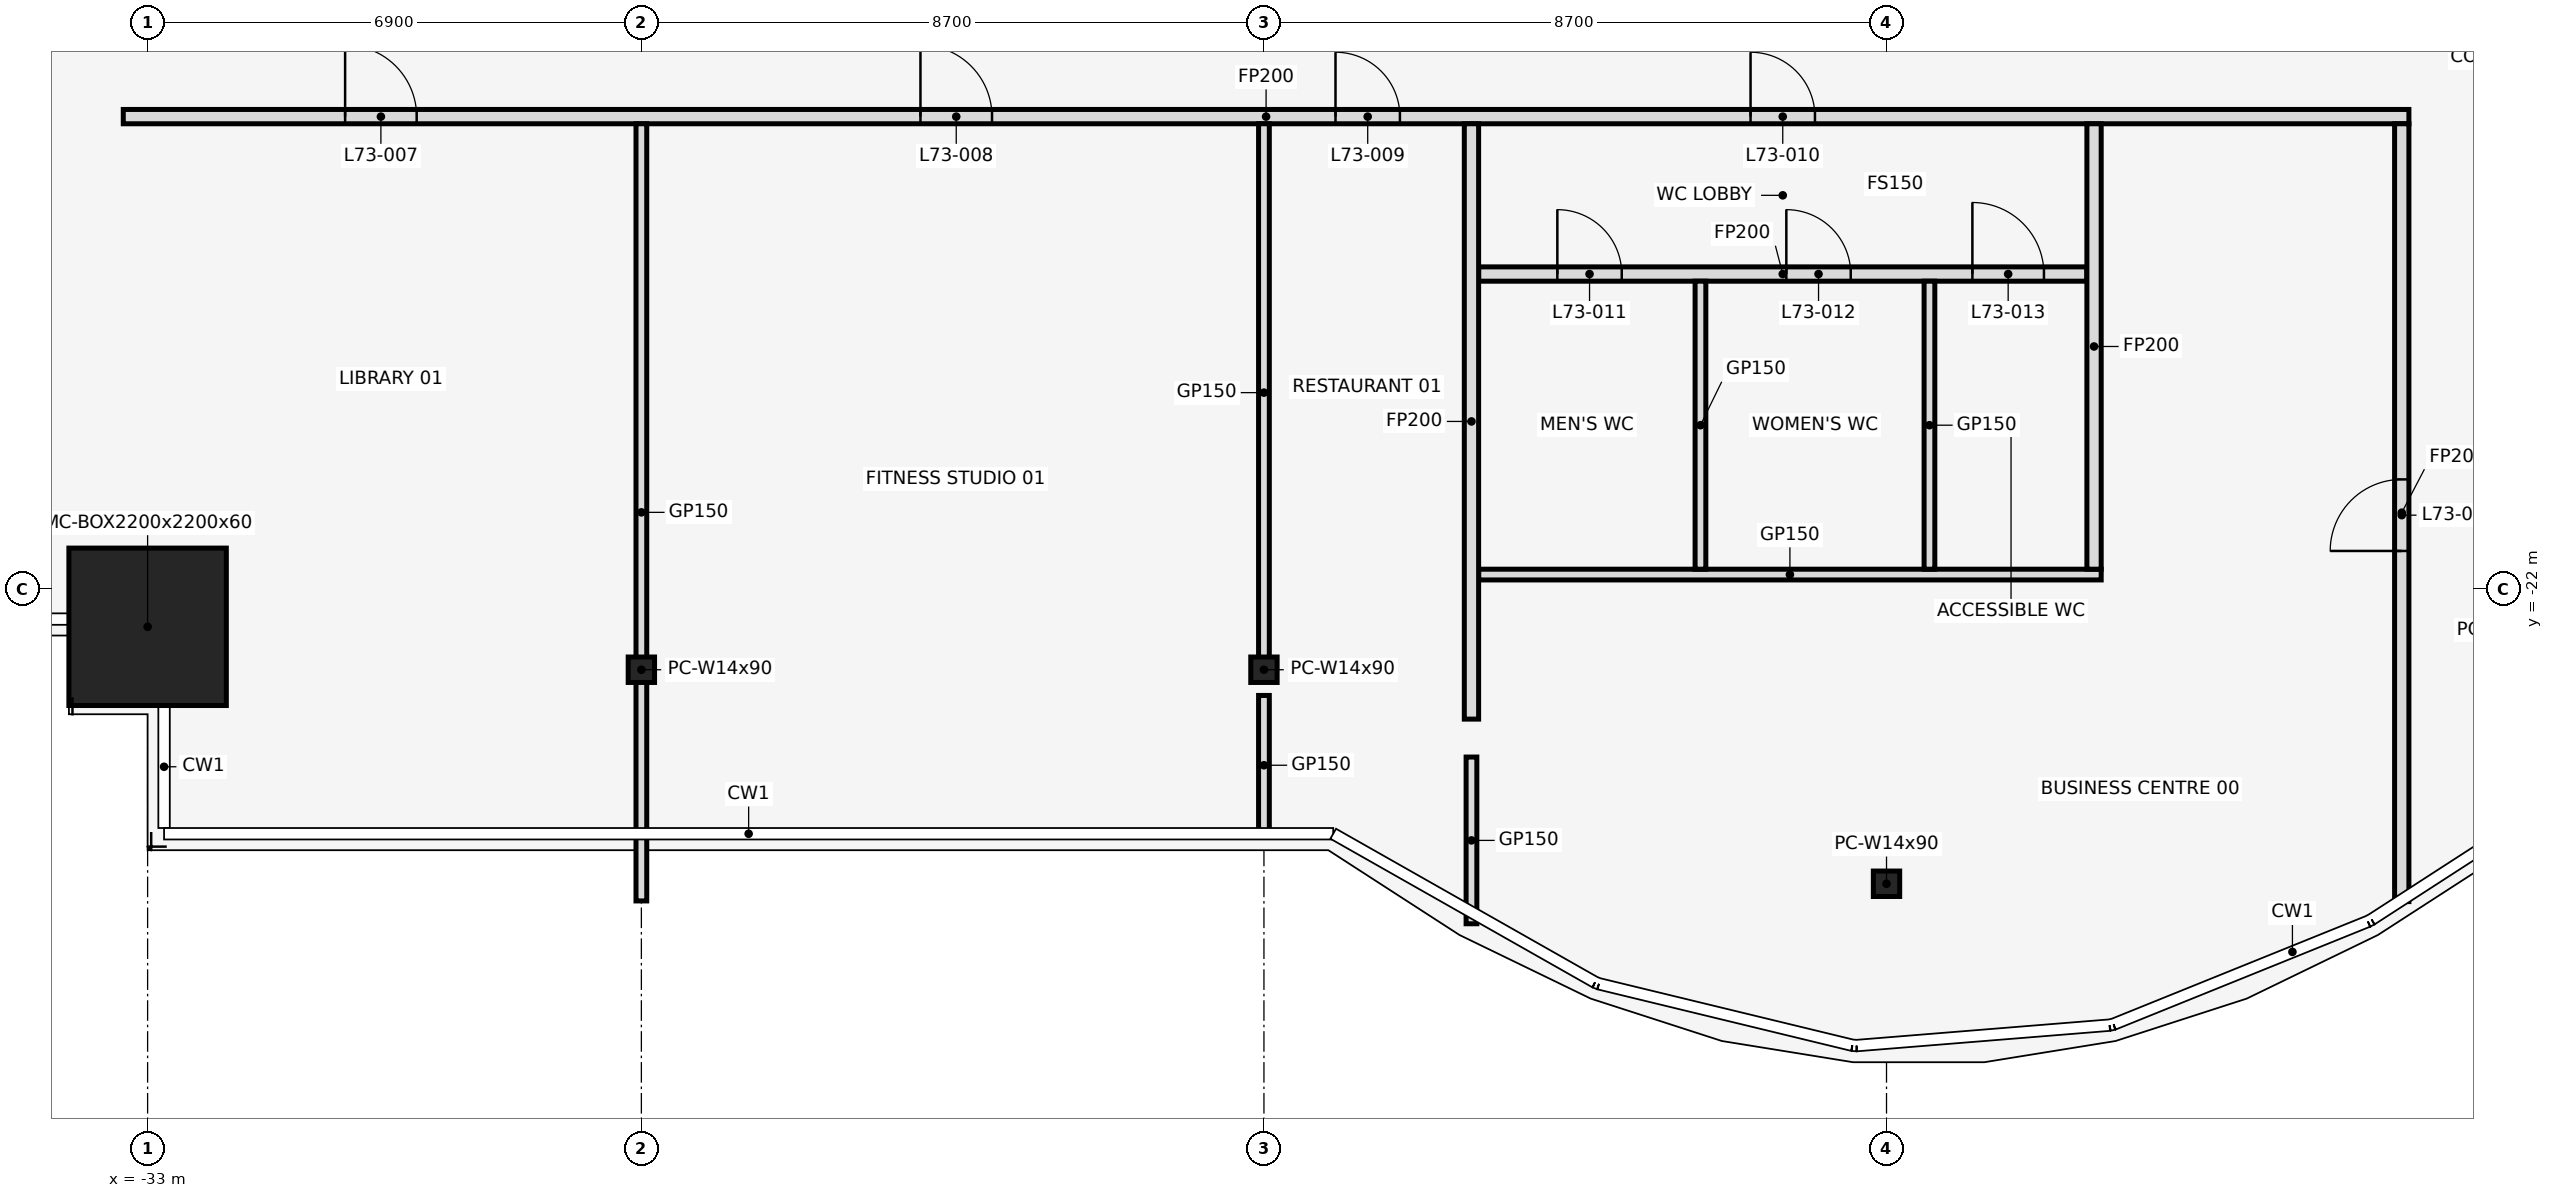
"""IFC4 building model, lengths in metres.
Left out: names, types, materials, properties, quantities, classifications, styles, units other than length and angle.
Written with IfcOpenShell. Run it as: python <this file> out.ifc"""

import sys

from ifc_helpers import new_model, si_unit, direction, frame, frame_2d, origin, origin_2d, place, context, subcontext, project, spatial, rectangle, hollow_rectangle, i_section, extrude, element, fill, save


model = new_model("IFC4")
c1 = context("Model", 3, precision=1e-05, world=origin(), true_north=direction((0.0, 1.0)))
c2 = subcontext(c1, "Body", "Model", "MODEL_VIEW")
j1 = project(units=[si_unit("LENGTHUNIT", "METRE"), si_unit("PLANEANGLEUNIT", "RADIAN")], contexts=[c1])
p1 = place(None, origin())
s1 = spatial("IfcSite", under=j1, at=p1, CompositionType="ELEMENT")
p2 = place(p1, origin())
s2 = spatial("IfcBuilding", under=s1, at=p2, CompositionType="ELEMENT")
p3 = place(p2, frame((0.0, 0.0, 324.5)))
s3 = spatial("IfcBuildingStorey", under=s2, at=p3, CompositionType="ELEMENT", Elevation=324.5)
p4 = place(p3, frame((-33.0, -22.53, 0.0), z_axis=(0.0, 0.0, 1.0), x_axis=(1.0, 0.0, 0.0)))
e1 = element("IfcColumn", 1, at=p4, inside=s3, PredefinedType="COLUMN", context=c2, shape_type="SweptSolid", body=[
    extrude(hollow_rectangle(XDim=2.2, YDim=2.2, WallThickness=0.06, at=origin_2d()), origin(), (0.0, 0.0, 1.0), 4.5),
])
for number, where, z_axis, x_axis in (
    (2, (-26.1, -23.13, 0.0), (0.0, 0.0, 1.0), (1.0, 0.0, 0.0)),
    (3, (-17.4, -23.13, 0.0), (0.0, 0.0, 1.0), (1.0, 0.0, 0.0)),
    (4, (-8.7, -26.121, 0.0), (0.0, 0.0, 1.0), (1.0, 0.0, 0.0)),
):
    element("IfcColumn", number, at=place(p3, frame(where, z_axis=z_axis, x_axis=x_axis)), inside=s3, PredefinedType="COLUMN", context=c2, shape_type="SweptSolid", body=[
        extrude(i_section(OverallWidth=0.368, OverallDepth=0.356, WebThickness=0.011, FlangeThickness=0.018, at=origin_2d()), origin(), (0.0, 0.0, 1.0), 4.5),
    ])
p5 = place(p3, frame((-14.4, -21.8, 0.0), z_axis=(0.0, 0.0, 1.0), x_axis=(1.0, 0.0, 0.0)))
e5 = element("IfcWall", 5, at=p5, inside=s3, PredefinedType="PARTITIONING", context=c2, shape_type="SweptSolid", body=[
    extrude(rectangle(XDim=8.7, YDim=0.15, at=frame_2d((4.35, 0.0))), origin(), (0.0, 0.0, 1.0), 3.418),
])
p6 = place(p3, frame((-14.4, -17.6, 0.0), z_axis=(0.0, 0.0, 1.0), x_axis=(1.0, 0.0, 0.0)))
e6 = element("IfcWall", 6, at=p6, inside=s3, PredefinedType="PARTITIONING", context=c2, shape_type="SweptSolid", body=[
    extrude(rectangle(XDim=8.5, YDim=0.2, at=frame_2d((4.25, 0.0))), origin(), (0.0, 0.0, 1.0), 3.418),
])
p7 = place(p6, frame((1.1, 0.0, 0.0)))
e7 = element("IfcOpeningElement", 7, at=p7, cuts=e6, PredefinedType="OPENING", context=c2, shape_type="SweptSolid", body=[
    extrude(rectangle(XDim=0.9, YDim=2.1, at=frame_2d((0.45, 1.05))), frame((0.0, 0.112, 0.0), z_axis=(0.0, -1.0, 0.0), x_axis=(1.0, 0.0, 0.0)), (0.0, 0.0, 1.0), 0.224),
])
p8 = place(p6, frame((4.3, 0.0, 0.0)))
e8 = element("IfcOpeningElement", 8, at=p8, cuts=e6, PredefinedType="OPENING", context=c2, shape_type="SweptSolid", body=[
    extrude(rectangle(XDim=0.9, YDim=2.1, at=frame_2d((0.45, 1.05))), frame((0.0, 0.112, 0.0), z_axis=(0.0, -1.0, 0.0), x_axis=(1.0, 0.0, 0.0)), (0.0, 0.0, 1.0), 0.224),
])
p9 = place(p6, frame((6.9, 0.0, 0.0)))
e9 = element("IfcOpeningElement", 9, at=p9, cuts=e6, PredefinedType="OPENING", context=c2, shape_type="SweptSolid", body=[
    extrude(rectangle(XDim=1.0, YDim=2.1, at=frame_2d((0.5, 1.05))), frame((0.0, 0.112, 0.0), z_axis=(0.0, -1.0, 0.0), x_axis=(1.0, 0.0, 0.0)), (0.0, 0.0, 1.0), 0.224),
])
p10 = place(p3, frame((-33.34, -15.4, 0.0), z_axis=(0.0, 0.0, 1.0), x_axis=(1.0, 0.0, 0.0)))
e10 = element("IfcWall", 10, at=p10, inside=s3, PredefinedType="PARTITIONING", context=c2, shape_type="SweptSolid", body=[
    extrude(rectangle(XDim=31.94, YDim=0.2, at=frame_2d((15.97, 0.0))), origin(), (0.0, 0.0, 1.0), 3.418),
])
p11 = place(p10, frame((3.1, 0.0, 0.0)))
e11 = element("IfcOpeningElement", 11, at=p11, cuts=e10, PredefinedType="OPENING", context=c2, shape_type="SweptSolid", body=[
    extrude(rectangle(XDim=1.0, YDim=2.1, at=frame_2d((0.5, 1.05))), frame((0.0, 0.112, 0.0), z_axis=(0.0, -1.0, 0.0), x_axis=(1.0, 0.0, 0.0)), (0.0, 0.0, 1.0), 0.224),
])
p12 = place(p10, frame((11.14, 0.0, 0.0)))
e12 = element("IfcOpeningElement", 12, at=p12, cuts=e10, PredefinedType="OPENING", context=c2, shape_type="SweptSolid", body=[
    extrude(rectangle(XDim=1.0, YDim=2.1, at=frame_2d((0.5, 1.05))), frame((0.0, 0.112, 0.0), z_axis=(0.0, -1.0, 0.0), x_axis=(1.0, 0.0, 0.0)), (0.0, 0.0, 1.0), 0.224),
])
p13 = place(p10, frame((16.94, 0.0, 0.0)))
e13 = element("IfcOpeningElement", 13, at=p13, cuts=e10, PredefinedType="OPENING", context=c2, shape_type="SweptSolid", body=[
    extrude(rectangle(XDim=0.9, YDim=2.1, at=frame_2d((0.45, 1.05))), frame((0.0, 0.112, 0.0), z_axis=(0.0, -1.0, 0.0), x_axis=(1.0, 0.0, 0.0)), (0.0, 0.0, 1.0), 0.224),
])
p14 = place(p10, frame((22.74, 0.0, 0.0)))
e14 = element("IfcOpeningElement", 14, at=p14, cuts=e10, PredefinedType="OPENING", context=c2, shape_type="SweptSolid", body=[
    extrude(rectangle(XDim=0.9, YDim=2.1, at=frame_2d((0.45, 1.05))), frame((0.0, 0.112, 0.0), z_axis=(0.0, -1.0, 0.0), x_axis=(1.0, 0.0, 0.0)), (0.0, 0.0, 1.0), 0.224),
])
p15 = place(p3, frame((-26.1, -26.361, 0.0), z_axis=(0.0, 0.0, 1.0), x_axis=(0.0, 1.0, 0.0)))
e15 = element("IfcWall", 15, at=p15, inside=s3, PredefinedType="PARTITIONING", context=c2, shape_type="SweptSolid", body=[
    extrude(rectangle(XDim=10.861, YDim=0.15, at=frame_2d((5.431, 0.0))), origin(), (0.0, 0.0, 1.0), 3.418),
])
p16 = place(p3, frame((-17.4, -25.44, 0.0), z_axis=(0.0, 0.0, 1.0), x_axis=(0.0, 1.0, 0.0)))
e16 = element("IfcWall", 16, at=p16, inside=s3, PredefinedType="PARTITIONING", context=c2, shape_type="SweptSolid", body=[
    extrude(rectangle(XDim=1.951, YDim=0.15, at=frame_2d((0.975, 0.0))), origin(), (0.0, 0.0, 1.0), 3.418),
])
p17 = place(p3, frame((-17.4, -23.015, 0.0), z_axis=(0.0, 0.0, 1.0), x_axis=(0.0, 1.0, 0.0)))
e17 = element("IfcWall", 17, at=p17, inside=s3, PredefinedType="PARTITIONING", context=c2, shape_type="SweptSolid", body=[
    extrude(rectangle(XDim=7.515, YDim=0.15, at=frame_2d((3.757, 0.0))), origin(), (0.0, 0.0, 1.0), 3.418),
])
p18 = place(p3, frame((-14.5, -26.68, 0.0), z_axis=(0.0, 0.0, 1.0), x_axis=(0.0, 1.0, 0.0)))
e18 = element("IfcWall", 18, at=p18, inside=s3, PredefinedType="PARTITIONING", context=c2, shape_type="SweptSolid", body=[
    extrude(rectangle(XDim=2.33, YDim=0.15, at=frame_2d((1.165, 0.0))), origin(), (0.0, 0.0, 1.0), 3.418),
])
p19 = place(p3, frame((-14.5, -23.82, 0.0), z_axis=(0.0, 0.0, 1.0), x_axis=(0.0, 1.0, 0.0)))
e19 = element("IfcWall", 19, at=p19, inside=s3, PredefinedType="PARTITIONING", context=c2, shape_type="SweptSolid", body=[
    extrude(rectangle(XDim=8.32, YDim=0.2, at=frame_2d((4.16, 0.0))), origin(), (0.0, 0.0, 1.0), 3.418),
])
for number, where, z_axis, x_axis in (
    (20, (-11.3, -21.725, 0.0), (0.0, 0.0, 1.0), (0.0, 1.0, 0.0)),
    (21, (-8.1, -21.725, 0.0), (0.0, 0.0, 1.0), (0.0, 1.0, 0.0)),
):
    element("IfcWall", number, at=place(p3, frame(where, z_axis=z_axis, x_axis=x_axis)), inside=s3, PredefinedType="PARTITIONING", context=c2, shape_type="SweptSolid", body=[
        extrude(rectangle(XDim=4.025, YDim=0.15, at=frame_2d((2.013, 0.0))), origin(), (0.0, 0.0, 1.0), 3.418),
    ])
p20 = place(p3, frame((-5.8, -21.725, 0.0), z_axis=(0.0, 0.0, 1.0), x_axis=(0.0, 1.0, 0.0)))
e22 = element("IfcWall", 22, at=p20, inside=s3, PredefinedType="PARTITIONING", context=c2, shape_type="SweptSolid", body=[
    extrude(rectangle(XDim=6.225, YDim=0.2, at=frame_2d((3.113, 0.0))), origin(), (0.0, 0.0, 1.0), 3.418),
])
p21 = place(p3, frame((-1.5, -26.37, 0.0), z_axis=(0.0, 0.0, 1.0), x_axis=(0.0, 1.0, 0.0)))
e23 = element("IfcWall", 23, at=p21, inside=s3, PredefinedType="PARTITIONING", context=c2, shape_type="SweptSolid", body=[
    extrude(rectangle(XDim=10.87, YDim=0.2, at=frame_2d((5.435, 0.0))), origin(), (0.0, 0.0, 1.0), 3.418),
])
p22 = place(p21, frame((4.9, 0.0, 0.0)))
e24 = element("IfcOpeningElement", 24, at=p22, cuts=e23, PredefinedType="OPENING", context=c2, shape_type="SweptSolid", body=[
    extrude(rectangle(XDim=1.0, YDim=2.1, at=frame_2d((0.5, 1.05))), frame((0.0, 0.112, 0.0), z_axis=(0.0, -1.0, 0.0), x_axis=(1.0, 0.0, 0.0)), (0.0, 0.0, 1.0), 0.224),
])
p23 = place(p11, frame((1.0, 0.0, 0.0), z_axis=(0.0, 0.0, 1.0), x_axis=(-1.0, 0.0, 0.0)))
e25 = element("IfcDoor", 25, at=p23, inside=s3, OperationType="SINGLE_SWING_LEFT", PredefinedType="DOOR", context=c2, shape_type="SweptSolid", body=[
    extrude(rectangle(XDim=1.0, YDim=2.1, at=frame_2d((0.5, 1.05))), frame((0.0, 0.025, 0.0), z_axis=(0.0, -1.0, 0.0), x_axis=(1.0, 0.0, 0.0)), (0.0, 0.0, 1.0), 0.05),
])
fill(e11, e25)
p24 = place(p12, frame((1.0, 0.0, 0.0), z_axis=(0.0, 0.0, 1.0), x_axis=(-1.0, 0.0, 0.0)))
e26 = element("IfcDoor", 26, at=p24, inside=s3, OperationType="SINGLE_SWING_RIGHT", PredefinedType="DOOR", context=c2, shape_type="SweptSolid", body=[
    extrude(rectangle(XDim=1.0, YDim=2.1, at=frame_2d((0.5, 1.05))), frame((0.0, 0.025, 0.0), z_axis=(0.0, -1.0, 0.0), x_axis=(1.0, 0.0, 0.0)), (0.0, 0.0, 1.0), 0.05),
])
fill(e12, e26)
p25 = place(p13, frame((0.9, 0.0, 0.0), z_axis=(0.0, 0.0, 1.0), x_axis=(-1.0, 0.0, 0.0)))
e27 = element("IfcDoor", 27, at=p25, inside=s3, OperationType="SINGLE_SWING_RIGHT", PredefinedType="DOOR", context=c2, shape_type="SweptSolid", body=[
    extrude(rectangle(XDim=0.9, YDim=2.1, at=frame_2d((0.45, 1.05))), frame((0.0, 0.025, 0.0), z_axis=(0.0, -1.0, 0.0), x_axis=(1.0, 0.0, 0.0)), (0.0, 0.0, 1.0), 0.05),
])
fill(e13, e27)
p26 = place(p14, frame((0.9, 0.0, 0.0), z_axis=(0.0, 0.0, 1.0), x_axis=(-1.0, 0.0, 0.0)))
e28 = element("IfcDoor", 28, at=p26, inside=s3, OperationType="SINGLE_SWING_LEFT", PredefinedType="DOOR", context=c2, shape_type="SweptSolid", body=[
    extrude(rectangle(XDim=0.9, YDim=2.1, at=frame_2d((0.45, 1.05))), frame((0.0, 0.025, 0.0), z_axis=(0.0, -1.0, 0.0), x_axis=(1.0, 0.0, 0.0)), (0.0, 0.0, 1.0), 0.05),
])
fill(e14, e28)
p27 = place(p7, frame((0.9, 0.0, 0.0), z_axis=(0.0, 0.0, 1.0), x_axis=(-1.0, 0.0, 0.0)))
e29 = element("IfcDoor", 29, at=p27, inside=s3, OperationType="SINGLE_SWING_RIGHT", PredefinedType="DOOR", context=c2, shape_type="SweptSolid", body=[
    extrude(rectangle(XDim=0.9, YDim=2.1, at=frame_2d((0.45, 1.05))), frame((0.0, 0.025, 0.0), z_axis=(0.0, -1.0, 0.0), x_axis=(1.0, 0.0, 0.0)), (0.0, 0.0, 1.0), 0.05),
])
fill(e7, e29)
p28 = place(p8, frame((0.9, 0.0, 0.0), z_axis=(0.0, 0.0, 1.0), x_axis=(-1.0, 0.0, 0.0)))
e30 = element("IfcDoor", 30, at=p28, inside=s3, OperationType="SINGLE_SWING_RIGHT", PredefinedType="DOOR", context=c2, shape_type="SweptSolid", body=[
    extrude(rectangle(XDim=0.9, YDim=2.1, at=frame_2d((0.45, 1.05))), frame((0.0, 0.025, 0.0), z_axis=(0.0, -1.0, 0.0), x_axis=(1.0, 0.0, 0.0)), (0.0, 0.0, 1.0), 0.05),
])
fill(e8, e30)
p29 = place(p9, frame((1.0, 0.0, 0.0), z_axis=(0.0, 0.0, 1.0), x_axis=(-1.0, 0.0, 0.0)))
e31 = element("IfcDoor", 31, at=p29, inside=s3, OperationType="SINGLE_SWING_LEFT", PredefinedType="DOOR", context=c2, shape_type="SweptSolid", body=[
    extrude(rectangle(XDim=1.0, YDim=2.1, at=frame_2d((0.5, 1.05))), frame((0.0, 0.025, 0.0), z_axis=(0.0, -1.0, 0.0), x_axis=(1.0, 0.0, 0.0)), (0.0, 0.0, 1.0), 0.05),
])
fill(e9, e31)
p30 = place(p22, origin())
e32 = element("IfcDoor", 32, at=p30, inside=s3, OperationType="SINGLE_SWING_LEFT", PredefinedType="DOOR", context=c2, shape_type="SweptSolid", body=[
    extrude(rectangle(XDim=1.0, YDim=2.1, at=frame_2d((0.5, 1.05))), frame((0.0, 0.025, 0.0), z_axis=(0.0, -1.0, 0.0), x_axis=(1.0, 0.0, 0.0)), (0.0, 0.0, 1.0), 0.05),
])
fill(e24, e32)
save(model, sys.argv[1])
